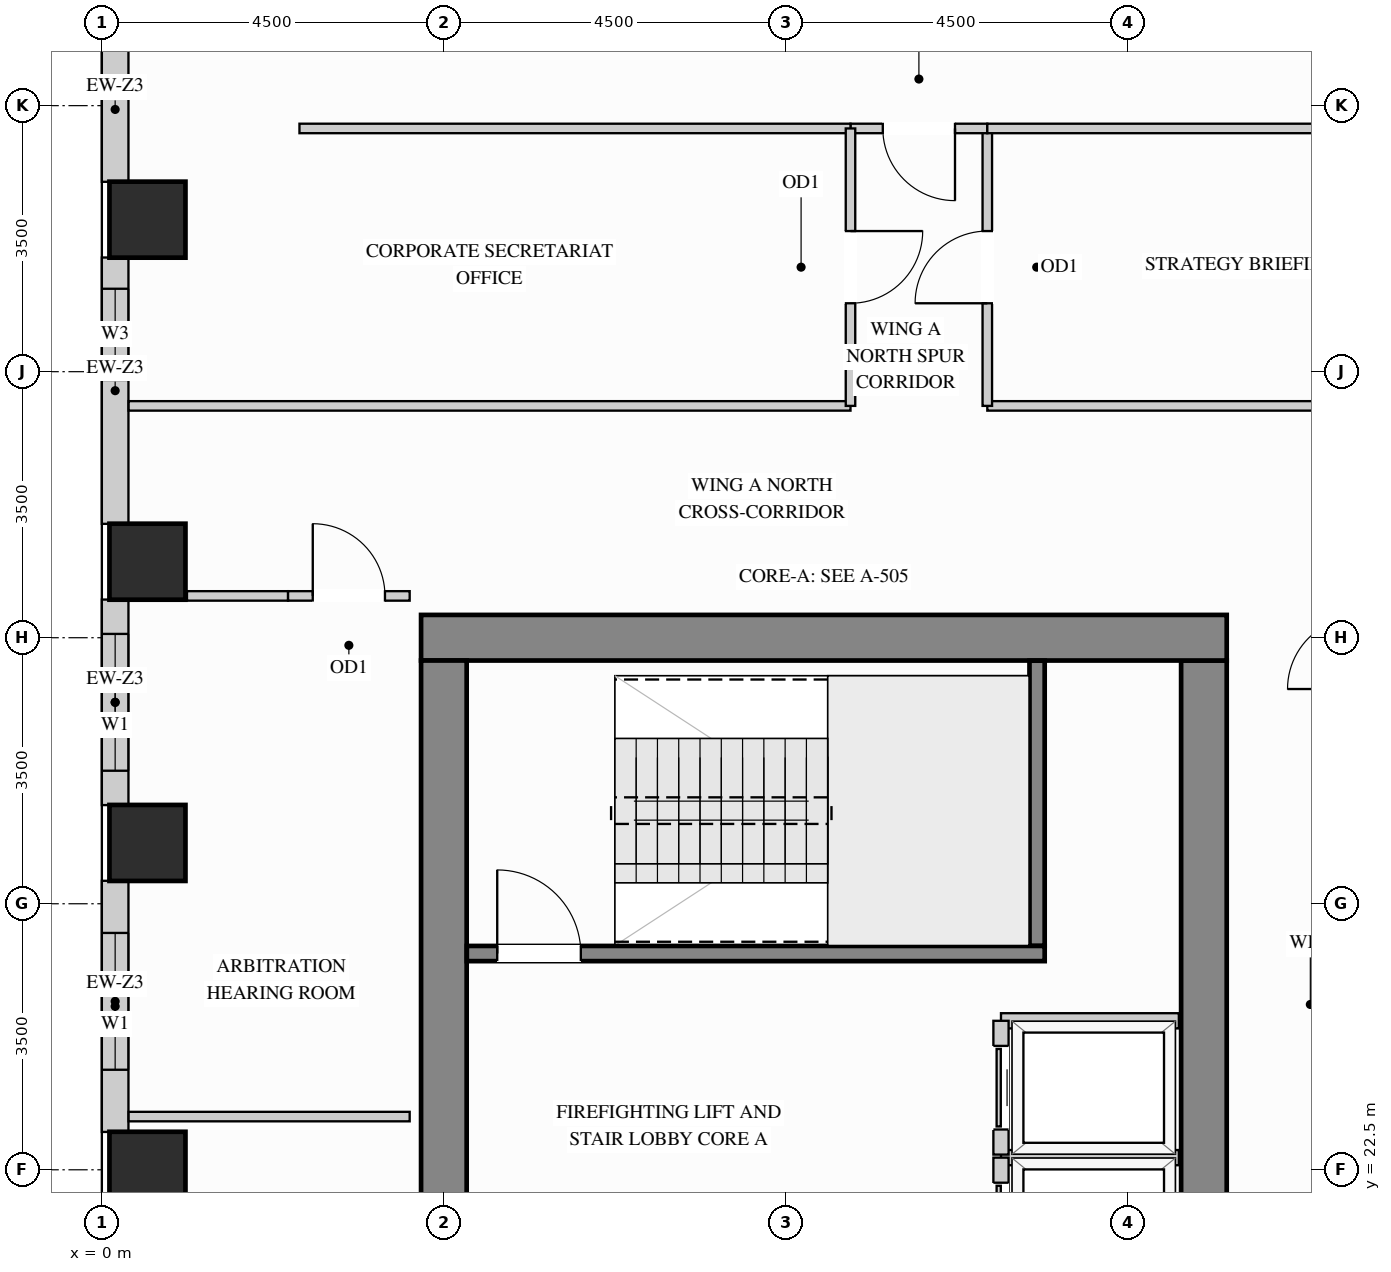
"""IFC4 building model, lengths in metres.
Left out: names, types, materials, properties, quantities, classifications, styles, units other than length and angle.
Written with IfcOpenShell. Run it as: python <this file> out.ifc"""

import sys

from ifc_helpers import new_model, si_unit, direction, frame, frame_2d, origin, origin_2d, place, context, subcontext, project, spatial, rectangle, extrude, source, transform, mapped, element, fill, save


model = new_model("IFC4")
c1 = context("Model", 3, precision=1e-05, world=origin(), true_north=direction((0.0, 1.0)))
c2 = subcontext(c1, "Body", "Model", "MODEL_VIEW")
j1 = project(units=[si_unit("LENGTHUNIT", "METRE"), si_unit("PLANEANGLEUNIT", "RADIAN")], contexts=[c1])
p1 = place(None, origin())
s1 = spatial("IfcSite", under=j1, at=p1, CompositionType="ELEMENT")
p2 = place(p1, origin())
s2 = spatial("IfcBuilding", under=s1, at=p2, CompositionType="ELEMENT")
p3 = place(p2, frame((0.0, 0.0, 179.1)))
s3 = spatial("IfcBuildingStorey", under=s2, at=p3, CompositionType="ELEMENT", Elevation=179.1)
m1 = source(origin(), c2, "Body", "SweptSolid", [
    extrude(rectangle(XDim=1.0, YDim=1.0, at=origin_2d()), origin(), (0.0, 0.0, 1.0), 3.4),
])
for number, where, z_axis, x_axis in (
    (1, (0.6, 22.5, 0.0), (0.0, 0.0, 1.0), (1.0, 0.0, 0.0)),
    (2, (0.6, 26.8, 0.0), (0.0, 0.0, 1.0), (1.0, 0.0, 0.0)),
    (3, (0.6, 30.5, 0.0), (0.0, 0.0, 1.0), (1.0, 0.0, 0.0)),
    (4, (0.6, 35.0, 0.0), (0.0, 0.0, 1.0), (1.0, 0.0, 0.0)),
):
    element("IfcColumn", number, at=place(p3, frame(where, z_axis=z_axis, x_axis=x_axis)), inside=s3, PredefinedType="COLUMN", context=c2, shape_type="MappedRepresentation", body=[
        mapped(m1, transform((0.0, 0.0, 0.0), x_axis=(1.0, 0.0, 0.0), y_axis=(0.0, 1.0, 0.0), z_axis=(0.0, 0.0, 1.0))),
    ])
m2 = source(origin(), c2, "Body", "SweptSolid", [
    extrude(rectangle(XDim=8.32, YDim=0.6, at=frame_2d((4.16, 0.0))), origin(), (0.0, 0.0, 1.0), 3.4),
])
p4 = place(p3, frame((14.5, 20.88, 0.0), z_axis=(0.0, 0.0, 1.0), x_axis=(0.0, 1.0, 0.0)))
e5 = element("IfcWall", 5, at=p4, inside=s3, PredefinedType="SHEAR", context=c2, shape_type="MappedRepresentation", body=[
    mapped(m2, transform((0.0, 0.0, 0.0), x_axis=(1.0, 0.0, 0.0), y_axis=(0.0, 1.0, 0.0), z_axis=(0.0, 0.0, 1.0))),
])
m3 = source(origin(), c2, "Body", "SweptSolid", [
    extrude(rectangle(XDim=10.6, YDim=0.6, at=frame_2d((5.3, 0.0))), origin(), (0.0, 0.0, 1.0), 3.4),
])
p5 = place(p3, frame((4.2, 29.5, 0.0), z_axis=(0.0, 0.0, 1.0), x_axis=(1.0, 0.0, 0.0)))
e6 = element("IfcWall", 6, at=p5, inside=s3, PredefinedType="SHEAR", context=c2, shape_type="MappedRepresentation", body=[
    mapped(m3, transform((0.0, 0.0, 0.0), x_axis=(1.0, 0.0, 0.0), y_axis=(0.0, 1.0, 0.0), z_axis=(0.0, 0.0, 1.0))),
])
m4 = source(origin(), c2, "Body", "SweptSolid", [
    extrude(rectangle(XDim=20.4, YDim=0.6, at=frame_2d((10.2, 0.0))), origin(), (0.0, 0.0, 1.0), 3.4),
])
p6 = place(p3, frame((4.5, 8.8, 0.0), z_axis=(0.0, 0.0, 1.0), x_axis=(0.0, 1.0, 0.0)))
e7 = element("IfcWall", 7, at=p6, inside=s3, PredefinedType="SHEAR", context=c2, shape_type="MappedRepresentation", body=[
    mapped(m4, transform((0.0, 0.0, 0.0), x_axis=(1.0, 0.0, 0.0), y_axis=(0.0, 1.0, 0.0), z_axis=(0.0, 0.0, 1.0))),
])
m5 = source(origin(), c2, "Body", "SweptSolid", [
    extrude(rectangle(XDim=1.904, YDim=0.35, at=frame_2d((0.952, 0.0))), origin(), (0.0, 0.0, 1.0), 2.612),
])
p7 = place(p3, frame((0.175, 37.402, 0.0), z_axis=(0.0, 0.0, 1.0), x_axis=(0.0, -1.0, 0.0)))
e8 = element("IfcWall", 8, at=p7, inside=s3, PredefinedType="SOLIDWALL", context=c2, shape_type="MappedRepresentation", body=[
    mapped(m5, transform((0.0, 0.0, 0.0), x_axis=(1.0, 0.0, 0.0), y_axis=(0.0, 1.0, 0.0), z_axis=(0.0, 0.0, 1.0))),
])
p8 = place(p3, frame((0.175, 34.502, 0.0), z_axis=(0.0, 0.0, 1.0), x_axis=(0.0, -1.0, 0.0)))
e9 = element("IfcWall", 9, at=p8, inside=s3, PredefinedType="SOLIDWALL", context=c2, shape_type="SweptSolid", body=[
    extrude(rectangle(XDim=3.504, YDim=0.35, at=frame_2d((1.752, 0.0))), origin(), (0.0, 0.0, 1.0), 2.612),
])
p9 = place(p8, frame((0.411, 0.0, 0.78)))
e10 = element("IfcOpeningElement", 10, at=p9, cuts=e9, PredefinedType="OPENING", context=c2, shape_type="SweptSolid", body=[
    extrude(rectangle(XDim=1.2, YDim=1.652, at=frame_2d((0.6, 0.826))), frame((0.0, 0.185, 0.0), z_axis=(0.0, -1.0, 0.0), x_axis=(1.0, 0.0, 0.0)), (0.0, 0.0, 1.0), 0.37),
])
p10 = place(p3, frame((0.175, 30.002, 0.0), z_axis=(0.0, 0.0, 1.0), x_axis=(0.0, -1.0, 0.0)))
e11 = element("IfcWall", 11, at=p10, inside=s3, PredefinedType="SOLIDWALL", context=c2, shape_type="SweptSolid", body=[
    extrude(rectangle(XDim=2.704, YDim=0.35, at=frame_2d((1.352, 0.0))), origin(), (0.0, 0.0, 1.0), 2.612),
])
p11 = place(p10, frame((0.452, 0.0, 0.78)))
e12 = element("IfcOpeningElement", 12, at=p11, cuts=e11, PredefinedType="OPENING", context=c2, shape_type="SweptSolid", body=[
    extrude(rectangle(XDim=1.8, YDim=1.652, at=frame_2d((0.9, 0.826))), frame((0.0, 0.185, 0.0), z_axis=(0.0, -1.0, 0.0), x_axis=(1.0, 0.0, 0.0)), (0.0, 0.0, 1.0), 0.37),
])
p12 = place(p3, frame((0.175, 26.302, 0.0), z_axis=(0.0, 0.0, 1.0), x_axis=(0.0, -1.0, 0.0)))
e13 = element("IfcWall", 13, at=p12, inside=s3, PredefinedType="SOLIDWALL", context=c2, shape_type="SweptSolid", body=[
    extrude(rectangle(XDim=3.304, YDim=0.35, at=frame_2d((1.652, 0.0))), origin(), (0.0, 0.0, 1.0), 2.612),
])
p13 = place(p12, frame((0.686, 0.0, 0.78)))
e14 = element("IfcOpeningElement", 14, at=p13, cuts=e13, PredefinedType="OPENING", context=c2, shape_type="SweptSolid", body=[
    extrude(rectangle(XDim=1.8, YDim=1.652, at=frame_2d((0.9, 0.826))), frame((0.0, 0.185, 0.0), z_axis=(0.0, -1.0, 0.0), x_axis=(1.0, 0.0, 0.0)), (0.0, 0.0, 1.0), 0.37),
])
m6 = source(origin(), c2, "Body", "SweptSolid", [
    extrude(rectangle(XDim=7.498, YDim=0.125, at=frame_2d((3.749, 0.0))), origin(), (0.0, 0.0, 1.0), 3.385),
])
p14 = place(p3, frame((11.65, 32.55, 0.0), z_axis=(0.0, 0.0, 1.0), x_axis=(1.0, 0.0, 0.0)))
e15 = element("IfcWall", 15, at=p14, inside=s3, PredefinedType="PARTITIONING", context=c2, shape_type="MappedRepresentation", body=[
    mapped(m6, transform((0.0, 0.0, 0.0), x_axis=(1.0, 0.0, 0.0), y_axis=(0.0, 1.0, 0.0), z_axis=(0.0, 0.0, 1.0))),
])
m7 = source(origin(), c2, "Body", "SweptSolid", [
    extrude(rectangle(XDim=9.498, YDim=0.125, at=frame_2d((4.749, 0.0))), origin(), (0.0, 0.0, 1.0), 3.385),
])
p15 = place(p3, frame((0.352, 32.55, 0.0), z_axis=(0.0, 0.0, 1.0), x_axis=(1.0, 0.0, 0.0)))
e16 = element("IfcWall", 16, at=p15, inside=s3, PredefinedType="PARTITIONING", context=c2, shape_type="MappedRepresentation", body=[
    mapped(m7, transform((0.0, 0.0, 0.0), x_axis=(1.0, 0.0, 0.0), y_axis=(0.0, 1.0, 0.0), z_axis=(0.0, 0.0, 1.0))),
])
m8 = source(origin(), c2, "Body", "SweptSolid", [
    extrude(rectangle(XDim=1.33, YDim=0.125, at=frame_2d((0.665, 0.0))), origin(), (0.0, 0.0, 1.0), 3.385),
])
p16 = place(p3, frame((1.12, 30.05, 0.0), z_axis=(0.0, 0.0, 1.0), x_axis=(1.0, 0.0, 0.0)))
e17 = element("IfcWall", 17, at=p16, inside=s3, PredefinedType="PARTITIONING", context=c2, shape_type="MappedRepresentation", body=[
    mapped(m8, transform((0.0, 0.0, 0.0), x_axis=(1.0, 0.0, 0.0), y_axis=(0.0, 1.0, 0.0), z_axis=(0.0, 0.0, 1.0))),
])
p17 = place(p3, frame((2.45, 30.05, 0.0), z_axis=(0.0, 0.0, 1.0), x_axis=(1.0, 0.0, 0.0)))
e18 = element("IfcWall", 18, at=p17, inside=s3, PredefinedType="PARTITIONING", context=c2, shape_type="SweptSolid", body=[
    extrude(rectangle(XDim=1.6, YDim=0.125, at=frame_2d((0.8, 0.0))), origin(), (0.0, 0.0, 1.0), 3.385),
])
p18 = place(p17, frame((0.325, 0.0, 0.0)))
e19 = element("IfcOpeningElement", 19, at=p18, cuts=e18, PredefinedType="OPENING", context=c2, shape_type="SweptSolid", body=[
    extrude(rectangle(XDim=0.95, YDim=2.15, at=frame_2d((0.475, 1.075))), frame((0.0, 0.073, 0.0), z_axis=(0.0, -1.0, 0.0), x_axis=(1.0, 0.0, 0.0)), (0.0, 0.0, 1.0), 0.145),
])
p19 = place(p3, frame((11.65, 32.55, 0.0), z_axis=(0.0, 0.0, 1.0), x_axis=(0.0, 1.0, 0.0)))
e20 = element("IfcWall", 20, at=p19, inside=s3, PredefinedType="PARTITIONING", context=c2, shape_type="SweptSolid", body=[
    extrude(rectangle(XDim=3.65, YDim=0.125, at=frame_2d((1.825, 0.0))), origin(), (0.0, 0.0, 1.0), 3.385),
])
p20 = place(p19, frame((1.35, 0.0, 0.0)))
e21 = element("IfcOpeningElement", 21, at=p20, cuts=e20, PredefinedType="OPENING", context=c2, shape_type="SweptSolid", body=[
    extrude(rectangle(XDim=0.95, YDim=2.15, at=frame_2d((0.475, 1.075))), frame((0.0, 0.073, 0.0), z_axis=(0.0, -1.0, 0.0), x_axis=(1.0, 0.0, 0.0)), (0.0, 0.0, 1.0), 0.145),
])
p21 = place(p3, frame((9.85, 36.2, 0.0), z_axis=(0.0, 0.0, 1.0), x_axis=(1.0, 0.0, 0.0)))
e22 = element("IfcWall", 22, at=p21, inside=s3, PredefinedType="PARTITIONING", context=c2, shape_type="SweptSolid", body=[
    extrude(rectangle(XDim=1.8, YDim=0.125, at=frame_2d((0.9, 0.0))), origin(), (0.0, 0.0, 1.0), 2.848),
])
p22 = place(p21, frame((0.425, 0.0, 0.0)))
e23 = element("IfcOpeningElement", 23, at=p22, cuts=e22, PredefinedType="OPENING", context=c2, shape_type="SweptSolid", body=[
    extrude(rectangle(XDim=0.95, YDim=2.15, at=frame_2d((0.475, 1.075))), frame((0.0, 0.073, 0.0), z_axis=(0.0, -1.0, 0.0), x_axis=(1.0, 0.0, 0.0)), (0.0, 0.0, 1.0), 0.145),
])
m9 = source(origin(), c2, "Body", "SweptSolid", [
    extrude(rectangle(XDim=5.25, YDim=0.125, at=frame_2d((2.625, 0.0))), origin(), (0.0, 0.0, 1.0), 2.848),
])
p23 = place(p3, frame((11.65, 36.2, 0.0), z_axis=(0.0, 0.0, 1.0), x_axis=(1.0, 0.0, 0.0)))
e24 = element("IfcWall", 24, at=p23, inside=s3, PredefinedType="PARTITIONING", context=c2, shape_type="MappedRepresentation", body=[
    mapped(m9, transform((0.0, 0.0, 0.0), x_axis=(1.0, 0.0, 0.0), y_axis=(0.0, 1.0, 0.0), z_axis=(0.0, 0.0, 1.0))),
])
m10 = source(origin(), c2, "Body", "SweptSolid", [
    extrude(rectangle(XDim=7.25, YDim=0.125, at=frame_2d((3.625, 0.0))), origin(), (0.0, 0.0, 1.0), 2.848),
])
p24 = place(p3, frame((2.6, 36.2, 0.0), z_axis=(0.0, 0.0, 1.0), x_axis=(1.0, 0.0, 0.0)))
e25 = element("IfcWall", 25, at=p24, inside=s3, PredefinedType="PARTITIONING", context=c2, shape_type="MappedRepresentation", body=[
    mapped(m10, transform((0.0, 0.0, 0.0), x_axis=(1.0, 0.0, 0.0), y_axis=(0.0, 1.0, 0.0), z_axis=(0.0, 0.0, 1.0))),
])
p25 = place(p3, frame((9.85, 32.55, 0.0), z_axis=(0.0, 0.0, 1.0), x_axis=(0.0, 1.0, 0.0)))
e26 = element("IfcWall", 26, at=p25, inside=s3, PredefinedType="PARTITIONING", context=c2, shape_type="SweptSolid", body=[
    extrude(rectangle(XDim=3.65, YDim=0.125, at=frame_2d((1.825, 0.0))), origin(), (0.0, 0.0, 1.0), 3.385),
])
p26 = place(p25, frame((1.35, 0.0, 0.0)))
e27 = element("IfcOpeningElement", 27, at=p26, cuts=e26, PredefinedType="OPENING", context=c2, shape_type="SweptSolid", body=[
    extrude(rectangle(XDim=0.95, YDim=2.15, at=frame_2d((0.475, 1.075))), frame((0.0, 0.073, 0.0), z_axis=(0.0, -1.0, 0.0), x_axis=(1.0, 0.0, 0.0)), (0.0, 0.0, 1.0), 0.145),
])
m11 = source(origin(), c2, "Body", "SweptSolid", [
    extrude(rectangle(XDim=3.698, YDim=0.125, at=frame_2d((1.849, 0.0))), origin(), (0.0, 0.0, 1.0), 3.385),
])
p27 = place(p3, frame((0.352, 23.2, 0.0), z_axis=(0.0, 0.0, 1.0), x_axis=(1.0, 0.0, 0.0)))
e28 = element("IfcWall", 28, at=p27, inside=s3, PredefinedType="PARTITIONING", context=c2, shape_type="MappedRepresentation", body=[
    mapped(m11, transform((0.0, 0.0, 0.0), x_axis=(1.0, 0.0, 0.0), y_axis=(0.0, 1.0, 0.0), z_axis=(0.0, 0.0, 1.0))),
])
m12 = source(origin(), c2, "Body", "SweptSolid", [
    extrude(rectangle(XDim=2.34, YDim=0.2, at=frame_2d((1.17, 0.0))), origin(), (0.0, 0.0, 1.0), 3.385),
])
p28 = place(p3, frame((11.83, 22.66, 0.0), z_axis=(0.0, 0.0, 1.0), x_axis=(1.0, 0.0, 0.0)))
e29 = element("IfcWall", 29, at=p28, inside=s3, PredefinedType="PARTITIONING", context=c2, shape_type="MappedRepresentation", body=[
    mapped(m12, transform((0.0, 0.0, 0.0), x_axis=(1.0, 0.0, 0.0), y_axis=(0.0, 1.0, 0.0), z_axis=(0.0, 0.0, 1.0))),
])
p29 = place(p3, frame((11.83, 20.9, 0.0), z_axis=(0.0, 0.0, 1.0), x_axis=(0.0, 1.0, 0.0)))
e30 = element("IfcWall", 30, at=p29, inside=s3, PredefinedType="PARTITIONING", context=c2, shape_type="SweptSolid", body=[
    extrude(rectangle(XDim=1.76, YDim=0.2, at=frame_2d((0.88, 0.0))), origin(), (0.0, 0.0, 1.0), 3.385),
])
p30 = place(p29, frame((0.33, 0.0, 0.0)))
e31 = element("IfcOpeningElement", 31, at=p30, cuts=e30, PredefinedType="OPENING", context=c2, shape_type="SweptSolid", body=[
    extrude(rectangle(XDim=1.1, YDim=2.2, at=frame_2d((0.55, 1.1))), frame((0.0, 0.11, 0.0), z_axis=(0.0, -1.0, 0.0), x_axis=(1.0, 0.0, 0.0)), (0.0, 0.0, 1.0), 0.22),
])
p31 = place(p3, frame((11.83, 24.46, 0.0), z_axis=(0.0, 0.0, 1.0), x_axis=(1.0, 0.0, 0.0)))
e32 = element("IfcWall", 32, at=p31, inside=s3, PredefinedType="PARTITIONING", context=c2, shape_type="MappedRepresentation", body=[
    mapped(m12, transform((0.0, 0.0, 0.0), x_axis=(1.0, 0.0, 0.0), y_axis=(0.0, 1.0, 0.0), z_axis=(0.0, 0.0, 1.0))),
])
p32 = place(p3, frame((11.83, 22.7, 0.0), z_axis=(0.0, 0.0, 1.0), x_axis=(0.0, 1.0, 0.0)))
e33 = element("IfcWall", 33, at=p32, inside=s3, PredefinedType="PARTITIONING", context=c2, shape_type="SweptSolid", body=[
    extrude(rectangle(XDim=1.76, YDim=0.2, at=frame_2d((0.88, 0.0))), origin(), (0.0, 0.0, 1.0), 3.385),
])
p33 = place(p32, frame((0.33, 0.0, 0.0)))
e34 = element("IfcOpeningElement", 34, at=p33, cuts=e33, PredefinedType="OPENING", context=c2, shape_type="SweptSolid", body=[
    extrude(rectangle(XDim=1.1, YDim=2.2, at=frame_2d((0.55, 1.1))), frame((0.0, 0.11, 0.0), z_axis=(0.0, -1.0, 0.0), x_axis=(1.0, 0.0, 0.0)), (0.0, 0.0, 1.0), 0.22),
])
m13 = source(origin(), c2, "Body", "SweptSolid", [
    extrude(rectangle(XDim=3.753, YDim=0.2, at=frame_2d((1.876, 0.0))), origin(), (0.0, 0.0, 1.0), 3.4),
])
p34 = place(p3, frame((12.305, 25.445, 0.0), z_axis=(0.0, 0.0, 1.0), x_axis=(0.0, 1.0, 0.0)))
e35 = element("IfcWall", 35, at=p34, inside=s3, PredefinedType="SHEAR", context=c2, shape_type="MappedRepresentation", body=[
    mapped(m13, transform((0.0, 0.0, 0.0), x_axis=(1.0, 0.0, 0.0), y_axis=(0.0, 1.0, 0.0), z_axis=(0.0, 0.0, 1.0))),
])
p35 = place(p3, frame((4.802, 25.345, 0.0), z_axis=(0.0, 0.0, 1.0), x_axis=(1.0, 0.0, 0.0)))
e36 = element("IfcWall", 36, at=p35, inside=s3, PredefinedType="SHEAR", context=c2, shape_type="SweptSolid", body=[
    extrude(rectangle(XDim=7.603, YDim=0.2, at=frame_2d((3.802, 0.0))), origin(), (0.0, 0.0, 1.0), 3.4),
])
p36 = place(p35, frame((0.4, 0.0, 0.0)))
e37 = element("IfcOpeningElement", 37, at=p36, cuts=e36, PredefinedType="OPENING", context=c2, shape_type="SweptSolid", body=[
    extrude(rectangle(XDim=1.1, YDim=2.15, at=frame_2d((0.55, 1.075))), frame((0.0, 0.11, 0.0), z_axis=(0.0, -1.0, 0.0), x_axis=(1.0, 0.0, 0.0)), (0.0, 0.0, 1.0), 0.22),
])
m14 = source(origin(), c2, "Body", "SweptSolid", [
    extrude(rectangle(XDim=1.1, YDim=2.2, at=frame_2d((0.55, 1.1))), frame((0.0, 0.025, 0.0), z_axis=(0.0, -1.0, 0.0), x_axis=(1.0, 0.0, 0.0)), (0.0, 0.0, 1.0), 0.05),
])
p37 = place(p30, origin())
e38 = element("IfcDoor", 38, at=p37, inside=s3, OperationType="SLIDING_TO_LEFT", PredefinedType="DOOR", context=c2, shape_type="MappedRepresentation", body=[
    mapped(m14, transform((0.0, 0.0, 0.0), x_axis=(1.0, 0.0, 0.0), y_axis=(0.0, 1.0, 0.0), z_axis=(0.0, 0.0, 1.0))),
])
fill(e31, e38)
p38 = place(p33, origin())
e39 = element("IfcDoor", 39, at=p38, inside=s3, OperationType="SLIDING_TO_LEFT", PredefinedType="DOOR", context=c2, shape_type="MappedRepresentation", body=[
    mapped(m14, transform((0.0, 0.0, 0.0), x_axis=(1.0, 0.0, 0.0), y_axis=(0.0, 1.0, 0.0), z_axis=(0.0, 0.0, 1.0))),
])
fill(e34, e39)
m15 = source(origin(), c2, "Body", "SweptSolid", [
    extrude(rectangle(XDim=0.95, YDim=2.15, at=frame_2d((0.475, 1.075))), frame((0.0, 0.025, 0.0), z_axis=(0.0, -1.0, 0.0), x_axis=(1.0, 0.0, 0.0)), (0.0, 0.0, 1.0), 0.05),
])
p39 = place(p20, origin())
e40 = element("IfcDoor", 40, at=p39, inside=s3, OperationType="SINGLE_SWING_LEFT", PredefinedType="DOOR", context=c2, shape_type="MappedRepresentation", body=[
    mapped(m15, transform((0.0, 0.0, 0.0), x_axis=(1.0, 0.0, 0.0), y_axis=(0.0, 1.0, 0.0), z_axis=(0.0, 0.0, 1.0))),
])
fill(e21, e40)
p40 = place(p22, origin())
e41 = element("IfcDoor", 41, at=p40, inside=s3, OperationType="SINGLE_SWING_RIGHT", PredefinedType="DOOR", context=c2, shape_type="MappedRepresentation", body=[
    mapped(m15, transform((0.0, 0.0, 0.0), x_axis=(1.0, 0.0, 0.0), y_axis=(0.0, 1.0, 0.0), z_axis=(0.0, 0.0, 1.0))),
])
fill(e23, e41)
p41 = place(p26, origin())
e42 = element("IfcDoor", 42, at=p41, inside=s3, OperationType="SINGLE_SWING_RIGHT", PredefinedType="DOOR", context=c2, shape_type="MappedRepresentation", body=[
    mapped(m15, transform((0.0, 0.0, 0.0), x_axis=(1.0, 0.0, 0.0), y_axis=(0.0, 1.0, 0.0), z_axis=(0.0, 0.0, 1.0))),
])
fill(e27, e42)
p42 = place(p18, origin())
e43 = element("IfcDoor", 43, at=p42, inside=s3, OperationType="SINGLE_SWING_LEFT", PredefinedType="DOOR", context=c2, shape_type="MappedRepresentation", body=[
    mapped(m15, transform((0.0, 0.0, 0.0), x_axis=(1.0, 0.0, 0.0), y_axis=(0.0, 1.0, 0.0), z_axis=(0.0, 0.0, 1.0))),
])
fill(e19, e43)
m16 = source(origin(), c2, "Body", "SweptSolid", [
    extrude(rectangle(XDim=1.1, YDim=2.15, at=frame_2d((0.55, 1.075))), frame((0.0, 0.025, 0.0), z_axis=(0.0, -1.0, 0.0), x_axis=(1.0, 0.0, 0.0)), (0.0, 0.0, 1.0), 0.05),
])
p43 = place(p36, origin())
e44 = element("IfcDoor", 44, at=p43, inside=s3, OperationType="SINGLE_SWING_LEFT", PredefinedType="DOOR", context=c2, shape_type="MappedRepresentation", body=[
    mapped(m16, transform((0.0, 0.0, 0.0), x_axis=(1.0, 0.0, 0.0), y_axis=(0.0, 1.0, 0.0), z_axis=(0.0, 0.0, 1.0))),
])
fill(e37, e44)
m17 = source(origin(), c2, "Body", "SweptSolid", [
    extrude(rectangle(XDim=1.8, YDim=1.652, at=frame_2d((0.9, 0.826))), frame((0.0, 0.03, 0.0), z_axis=(0.0, -1.0, 0.0), x_axis=(1.0, 0.0, 0.0)), (0.0, 0.0, 1.0), 0.06),
])
p44 = place(p11, origin())
e45 = element("IfcWindow", 45, at=p44, inside=s3, PartitioningType="SINGLE_PANEL", PredefinedType="WINDOW", context=c2, shape_type="MappedRepresentation", body=[
    mapped(m17, transform((0.0, 0.0, 0.0), x_axis=(1.0, 0.0, 0.0), y_axis=(0.0, 1.0, 0.0), z_axis=(0.0, 0.0, 1.0))),
])
fill(e12, e45)
p45 = place(p13, origin())
e46 = element("IfcWindow", 46, at=p45, inside=s3, PartitioningType="SINGLE_PANEL", PredefinedType="WINDOW", context=c2, shape_type="MappedRepresentation", body=[
    mapped(m17, transform((0.0, 0.0, 0.0), x_axis=(1.0, 0.0, 0.0), y_axis=(0.0, 1.0, 0.0), z_axis=(0.0, 0.0, 1.0))),
])
fill(e14, e46)
m18 = source(origin(), c2, "Body", "SweptSolid", [
    extrude(rectangle(XDim=1.2, YDim=1.652, at=frame_2d((0.6, 0.826))), frame((0.0, 0.03, 0.0), z_axis=(0.0, -1.0, 0.0), x_axis=(1.0, 0.0, 0.0)), (0.0, 0.0, 1.0), 0.06),
])
p46 = place(p9, origin())
e47 = element("IfcWindow", 47, at=p46, inside=s3, PartitioningType="SINGLE_PANEL", PredefinedType="WINDOW", context=c2, shape_type="MappedRepresentation", body=[
    mapped(m18, transform((0.0, 0.0, 0.0), x_axis=(1.0, 0.0, 0.0), y_axis=(0.0, 1.0, 0.0), z_axis=(0.0, 0.0, 1.0))),
])
fill(e10, e47)
save(model, sys.argv[1])
